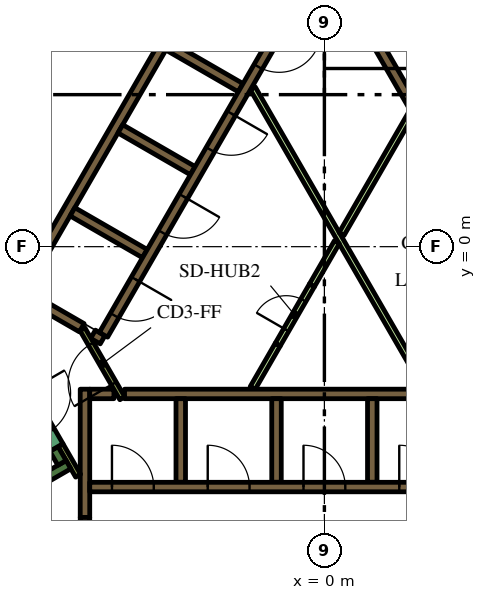
"""IFC4 building model, lengths in metres.
Left out: names, types, materials, properties, quantities, classifications, styles, units other than length and angle.
Written with IfcOpenShell. Run it as: python <this file> out.ifc"""

import sys

from ifc_helpers import new_model, si_unit, direction, frame, frame_2d, origin, place, context, subcontext, project, spatial, rectangle, extrude, element, fill, save


model = new_model("IFC4")
c1 = context("Model", 3, precision=1e-05, world=origin(), true_north=direction((0.0, 1.0)))
c2 = subcontext(c1, "Body", "Model", "MODEL_VIEW")
j1 = project(units=[si_unit("LENGTHUNIT", "METRE"), si_unit("PLANEANGLEUNIT", "RADIAN")], contexts=[c1])
p1 = place(None, origin())
s1 = spatial("IfcSite", under=j1, at=p1, CompositionType="ELEMENT")
p2 = place(p1, origin())
s2 = spatial("IfcBuilding", under=s1, at=p2, CompositionType="ELEMENT")
p3 = place(p2, frame((0.0, 0.0, 201.6)))
s3 = spatial("IfcBuildingStorey", under=s2, at=p3, CompositionType="ELEMENT", Elevation=201.6)
p4 = place(p3, frame((-12.625, -1.867, 0.0), z_axis=(0.0, 0.0, 1.0), x_axis=(0.499998841866, 0.866026072432, 0.0)))
e1 = element("IfcWall", 1, at=p4, inside=s3, PredefinedType="SOLIDWALL", context=c2, shape_type="SweptSolid", body=[
    extrude(rectangle(XDim=16.694, YDim=0.7, at=frame_2d((8.347, 0.0))), origin(), (0.0, 0.0, 1.0), 4.2),
])
p5 = place(p3, frame((-12.84, -9.261, 0.0), z_axis=(0.0, 0.0, 1.0), x_axis=(0.866016039709, 0.500016218704, 0.0)))
e2 = element("IfcWall", 2, at=p5, inside=s3, PredefinedType="SOLIDWALL", context=c2, shape_type="SweptSolid", body=[
    extrude(rectangle(XDim=7.05, YDim=0.25, at=frame_2d((3.525, 0.0))), origin(), (0.0, 0.0, 1.0), 4.2),
])
p6 = place(p3, frame((-6.905, -5.69, 0.0), z_axis=(0.0, 0.0, 1.0), x_axis=(-0.500402024738, 0.865793170242, 0.0)))
e3 = element("IfcWall", 3, at=p6, inside=s3, PredefinedType="SOLIDWALL", context=c2, shape_type="SweptSolid", body=[
    extrude(rectangle(XDim=0.425, YDim=0.25, at=frame_2d((0.212, 0.0))), origin(), (0.0, 0.0, 1.0), 4.2),
])
p7 = place(p3, frame((-5.259, -3.875, 0.0), z_axis=(0.0, 0.0, 1.0), x_axis=(1.0, 0.0, 0.0)))
e4 = element("IfcWall", 4, at=p7, inside=s3, PredefinedType="SOLIDWALL", context=c2, shape_type="SweptSolid", body=[
    extrude(rectangle(XDim=10.489, YDim=0.25, at=frame_2d((5.244, 0.0))), origin(), (0.0, 0.0, 1.0), 4.2),
])
for number, where, z_axis, x_axis in (
    (5, (1.26, -4.0, 0.0), (0.0, 0.0, 1.0), (0.0, -1.0, 0.0)),
    (6, (-1.26, -4.0, 0.0), (0.0, 0.0, 1.0), (0.0, -1.0, 0.0)),
    (7, (-3.78, -4.0, 0.0), (0.0, 0.0, 1.0), (0.0, -1.0, 0.0)),
):
    element("IfcWall", number, at=place(p3, frame(where, z_axis=z_axis, x_axis=x_axis)), inside=s3, PredefinedType="SOLIDWALL", context=c2, shape_type="SweptSolid", body=[
        extrude(rectangle(XDim=2.2, YDim=0.25, at=frame_2d((1.1, 0.0))), origin(), (0.0, 0.0, 1.0), 4.2),
    ])
p8 = place(p3, frame((-6.3, -7.125, 0.0), z_axis=(0.0, 0.0, 1.0), x_axis=(0.0, 1.0, 0.0)))
e8 = element("IfcWall", 8, at=p8, inside=s3, PredefinedType="SOLIDWALL", context=c2, shape_type="SweptSolid", body=[
    extrude(rectangle(XDim=3.375, YDim=0.25, at=frame_2d((1.687, 0.0))), origin(), (0.0, 0.0, 1.0), 4.2),
])
p9 = place(p3, frame((-6.175, -3.875, 0.0), z_axis=(0.0, 0.0, 1.0), x_axis=(1.0, 0.0, 0.0)))
e9 = element("IfcWall", 9, at=p9, inside=s3, PredefinedType="SOLIDWALL", context=c2, shape_type="SweptSolid", body=[
    extrude(rectangle(XDim=0.637, YDim=0.25, at=frame_2d((0.318, 0.0))), origin(), (0.0, 0.0, 1.0), 4.2),
])
p10 = place(p3, frame((5.97, -2.591, 0.0), z_axis=(0.0, 0.0, 1.0), x_axis=(-0.499994469932, 0.866028596547, 0.0)))
e10 = element("IfcWall", 10, at=p10, inside=s3, PredefinedType="SOLIDWALL", context=c2, shape_type="SweptSolid", body=[
    extrude(rectangle(XDim=10.488, YDim=0.25, at=frame_2d((5.244, 0.0))), origin(), (0.0, 0.0, 1.0), 4.2),
])
p11 = place(p3, frame((-3.02, 7.419, 0.0), z_axis=(0.0, 0.0, 1.0), x_axis=(-0.500022956343, -0.866012149528, 0.0)))
e11 = element("IfcWall", 11, at=p11, inside=s3, PredefinedType="SOLIDWALL", context=c2, shape_type="SweptSolid", body=[
    extrude(rectangle(XDim=10.08, YDim=0.25, at=frame_2d((5.04, 0.0))), origin(), (0.0, 0.0, 1.0), 4.2),
])
for number, where, z_axis, x_axis in (
    (12, (-2.204, 4.182, 0.0), (0.0, 0.0, 1.0), (-0.866, 0.5, 0.0)),
    (13, (-5.369, 3.1, 0.0), (0.0, 0.0, 1.0), (0.866, -0.5, 0.0)),
    (14, (-4.724, -0.182, 0.0), (0.0, 0.0, 1.0), (-0.866, 0.5, 0.0)),
):
    element("IfcWall", number, at=place(p3, frame(where, z_axis=z_axis, x_axis=x_axis)), inside=s3, PredefinedType="SOLIDWALL", context=c2, shape_type="SweptSolid", body=[
        extrude(rectangle(XDim=2.2, YDim=0.25, at=frame_2d((1.1, 0.0))), origin(), (0.0, 0.0, 1.0), 4.2),
    ])
p12 = place(p3, frame((-6.088, -2.305, 0.0), z_axis=(0.0, 0.0, 1.0), x_axis=(0.866059450854, -0.499941024108, 0.0)))
e15 = element("IfcWall", 15, at=p12, inside=s3, PredefinedType="SOLIDWALL", context=c2, shape_type="SweptSolid", body=[
    extrude(rectangle(XDim=0.29, YDim=0.25, at=frame_2d((0.145, 0.0))), origin(), (0.0, 0.0, 1.0), 4.2),
])
p13 = place(p3, frame((-7.889, -1.265, 0.0), z_axis=(0.0, 0.0, 1.0), x_axis=(0.865986741702, -0.500066958712, 0.0)))
e16 = element("IfcWall", 16, at=p13, inside=s3, PredefinedType="SOLIDWALL", context=c2, shape_type="SweptSolid", body=[
    extrude(rectangle(XDim=1.738, YDim=0.25, at=frame_2d((0.869, 0.0))), origin(), (0.0, 0.0, 1.0), 4.2),
])
p14 = place(p3, frame((-6.48, -6.027, 0.0), z_axis=(0.0, 0.0, 1.0), x_axis=(-0.499927229454, 0.866067413802, 0.0)))
e17 = element("IfcWall", 17, at=p14, inside=s3, PredefinedType="PARTITIONING", context=c2, shape_type="SweptSolid", body=[
    extrude(rectangle(XDim=0.929, YDim=0.15, at=frame_2d((0.464, 0.0))), origin(), (0.0, 0.0, 1.0), 4.2),
])
p15 = place(p3, frame((-1.887, 4.168, 0.0), z_axis=(0.0, 0.0, 1.0), x_axis=(0.499997069472, -0.866027095719, 0.0)))
e18 = element("IfcWall", 18, at=p15, inside=s3, PredefinedType="PARTITIONING", context=c2, shape_type="SweptSolid", body=[
    extrude(rectangle(XDim=9.106, YDim=0.15, at=frame_2d((4.553, 0.0))), origin(), (0.0, 0.0, 1.0), 3.45),
])
p16 = place(p3, frame((-0.329, -1.021, 0.0), z_axis=(0.0, 0.0, 1.0), x_axis=(0.500033191285, 0.866006239939, 0.0)))
e19 = element("IfcWall", 19, at=p16, inside=s3, PredefinedType="PARTITIONING", context=c2, shape_type="SweptSolid", body=[
    extrude(rectangle(XDim=1.315, YDim=0.15, at=frame_2d((0.657, 0.0))), origin(), (0.0, 0.0, 1.0), 3.45),
])
p17 = place(p3, frame((2.277, 3.493, 0.0), z_axis=(0.0, 0.0, 1.0), x_axis=(-0.499994550825, -0.866028549844, 0.0)))
e20 = element("IfcWall", 20, at=p17, inside=s3, PredefinedType="PARTITIONING", context=c2, shape_type="SweptSolid", body=[
    extrude(rectangle(XDim=3.65, YDim=0.15, at=frame_2d((1.825, 0.0))), origin(), (0.0, 0.0, 1.0), 3.45),
])
p18 = place(p3, frame((-1.887, -3.718, 0.0), z_axis=(0.0, 0.0, 1.0), x_axis=(0.500033191285, 0.866006239939, 0.0)))
e21 = element("IfcWall", 21, at=p18, inside=s3, PredefinedType="PARTITIONING", context=c2, shape_type="SweptSolid", body=[
    extrude(rectangle(XDim=1.315, YDim=0.15, at=frame_2d((0.657, 0.0))), origin(), (0.0, 0.0, 1.0), 3.45),
])
p19 = place(p3, frame((-6.175, -6.325, 0.0), z_axis=(0.0, 0.0, 1.0), x_axis=(1.0, 0.0, 0.0)))
e22 = element("IfcWall", 22, at=p19, inside=s3, PredefinedType="SOLIDWALL", context=c2, shape_type="SweptSolid", body=[
    extrude(rectangle(XDim=12.35, YDim=0.25, at=frame_2d((6.175, 0.0))), origin(), (0.0, 0.0, 1.0), 4.2),
])
p20 = place(p19, frame((0.585, 0.0, 0.0)))
e23 = element("IfcOpeningElement", 23, at=p20, cuts=e22, PredefinedType="OPENING", context=c2, shape_type="SweptSolid", body=[
    extrude(rectangle(XDim=1.1, YDim=2.1, at=frame_2d((0.55, 1.05))), frame((0.0, 0.135, 0.0), z_axis=(0.0, -1.0, 0.0), x_axis=(1.0, 0.0, 0.0)), (0.0, 0.0, 1.0), 0.27),
])
p21 = place(p19, frame((3.105, 0.0, 0.0)))
e24 = element("IfcOpeningElement", 24, at=p21, cuts=e22, PredefinedType="OPENING", context=c2, shape_type="SweptSolid", body=[
    extrude(rectangle(XDim=1.1, YDim=2.1, at=frame_2d((0.55, 1.05))), frame((0.0, 0.135, 0.0), z_axis=(0.0, -1.0, 0.0), x_axis=(1.0, 0.0, 0.0)), (0.0, 0.0, 1.0), 0.27),
])
p22 = place(p19, frame((5.625, 0.0, 0.0)))
e25 = element("IfcOpeningElement", 25, at=p22, cuts=e22, PredefinedType="OPENING", context=c2, shape_type="SweptSolid", body=[
    extrude(rectangle(XDim=1.1, YDim=2.1, at=frame_2d((0.55, 1.05))), frame((0.0, 0.135, 0.0), z_axis=(0.0, -1.0, 0.0), x_axis=(1.0, 0.0, 0.0)), (0.0, 0.0, 1.0), 0.27),
])
p23 = place(p19, frame((8.145, 0.0, 0.0)))
e26 = element("IfcOpeningElement", 26, at=p23, cuts=e22, PredefinedType="OPENING", context=c2, shape_type="SweptSolid", body=[
    extrude(rectangle(XDim=1.1, YDim=2.1, at=frame_2d((0.55, 1.05))), frame((0.0, 0.135, 0.0), z_axis=(0.0, -1.0, 0.0), x_axis=(1.0, 0.0, 0.0)), (0.0, 0.0, 1.0), 0.27),
])
p24 = place(p19, frame((10.665, 0.0, 0.0)))
e27 = element("IfcOpeningElement", 27, at=p24, cuts=e22, PredefinedType="OPENING", context=c2, shape_type="SweptSolid", body=[
    extrude(rectangle(XDim=1.1, YDim=2.1, at=frame_2d((0.55, 1.05))), frame((0.0, 0.135, 0.0), z_axis=(0.0, -1.0, 0.0), x_axis=(1.0, 0.0, 0.0)), (0.0, 0.0, 1.0), 0.27),
])
p25 = place(p3, frame((-0.898, 6.194, 0.0), z_axis=(0.0, 0.0, 1.0), x_axis=(-0.499996202215, -0.866027596426, 0.0)))
e28 = element("IfcWall", 28, at=p25, inside=s3, PredefinedType="SOLIDWALL", context=c2, shape_type="SweptSolid", body=[
    extrude(rectangle(XDim=9.83, YDim=0.25, at=frame_2d((4.915, 0.0))), origin(), (0.0, 0.0, 1.0), 4.2),
])
p26 = place(p25, frame((0.585, 0.0, 0.0)))
e29 = element("IfcOpeningElement", 29, at=p26, cuts=e28, PredefinedType="OPENING", context=c2, shape_type="SweptSolid", body=[
    extrude(rectangle(XDim=1.1, YDim=2.1, at=frame_2d((0.55, 1.05))), frame((0.0, 0.135, 0.0), z_axis=(0.0, -1.0, 0.0), x_axis=(1.0, 0.0, 0.0)), (0.0, 0.0, 1.0), 0.27),
])
p27 = place(p25, frame((3.105, 0.0, 0.0)))
e30 = element("IfcOpeningElement", 30, at=p27, cuts=e28, PredefinedType="OPENING", context=c2, shape_type="SweptSolid", body=[
    extrude(rectangle(XDim=1.1, YDim=2.1, at=frame_2d((0.55, 1.05))), frame((0.0, 0.135, 0.0), z_axis=(0.0, -1.0, 0.0), x_axis=(1.0, 0.0, 0.0)), (0.0, 0.0, 1.0), 0.27),
])
p28 = place(p25, frame((5.625, 0.0, 0.0)))
e31 = element("IfcOpeningElement", 31, at=p28, cuts=e28, PredefinedType="OPENING", context=c2, shape_type="SweptSolid", body=[
    extrude(rectangle(XDim=1.1, YDim=2.1, at=frame_2d((0.55, 1.05))), frame((0.0, 0.135, 0.0), z_axis=(0.0, -1.0, 0.0), x_axis=(1.0, 0.0, 0.0)), (0.0, 0.0, 1.0), 0.27),
])
p29 = place(p25, frame((8.145, 0.0, 0.0)))
e32 = element("IfcOpeningElement", 32, at=p29, cuts=e28, PredefinedType="OPENING", context=c2, shape_type="SweptSolid", body=[
    extrude(rectangle(XDim=1.1, YDim=2.1, at=frame_2d((0.55, 1.05))), frame((0.0, 0.135, 0.0), z_axis=(0.0, -1.0, 0.0), x_axis=(1.0, 0.0, 0.0)), (0.0, 0.0, 1.0), 0.27),
])
p30 = place(p3, frame((-8.103, -3.466, 0.0), z_axis=(0.0, 0.0, 1.0), x_axis=(0.500078061341, -0.865980330357, 0.0)))
e33 = element("IfcWall", 33, at=p30, inside=s3, PredefinedType="SOLIDWALL", context=c2, shape_type="SweptSolid", body=[
    extrude(rectangle(XDim=2.1, YDim=0.4, at=frame_2d((1.05, 0.0))), origin(), (0.0, 0.0, 1.0), 4.2),
])
p31 = place(p30, frame((0.45, 0.0, 0.0)))
e34 = element("IfcOpeningElement", 34, at=p31, cuts=e33, PredefinedType="OPENING", context=c2, shape_type="SweptSolid", body=[
    extrude(rectangle(XDim=1.2, YDim=2.1, at=frame_2d((0.6, 1.05))), frame((0.0, 0.21, 0.0), z_axis=(0.0, -1.0, 0.0), x_axis=(1.0, 0.0, 0.0)), (0.0, 0.0, 1.0), 0.42),
])
p32 = place(p3, frame((-6.3, -7.125, 0.0), z_axis=(0.0, 0.0, 1.0), x_axis=(0.0, -1.0, 0.0)))
e35 = element("IfcWall", 35, at=p32, inside=s3, PredefinedType="SOLIDWALL", context=c2, shape_type="SweptSolid", body=[
    extrude(rectangle(XDim=1.8, YDim=0.25, at=frame_2d((0.9, 0.0))), origin(), (0.0, 0.0, 1.0), 4.2),
])
p33 = place(p32, frame((0.45, 0.0, 0.0)))
e36 = element("IfcOpeningElement", 36, at=p33, cuts=e35, PredefinedType="OPENING", context=c2, shape_type="SweptSolid", body=[
    extrude(rectangle(XDim=0.9, YDim=2.1, at=frame_2d((0.45, 1.05))), frame((0.0, 0.135, 0.0), z_axis=(0.0, -1.0, 0.0), x_axis=(1.0, 0.0, 0.0)), (0.0, 0.0, 1.0), 0.27),
])
p34 = place(p3, frame((-5.317, -3.99, 0.0), z_axis=(0.0, 0.0, 1.0), x_axis=(-0.500027713859, 0.866009402589, 0.0)))
e37 = element("IfcWall", 37, at=p34, inside=s3, PredefinedType="PARTITIONING", context=c2, shape_type="SweptSolid", body=[
    extrude(rectangle(XDim=2.1, YDim=0.15, at=frame_2d((1.05, 0.0))), origin(), (0.0, 0.0, 1.0), 4.2),
])
p35 = place(p34, frame((0.45, 0.0, 0.0)))
e38 = element("IfcOpeningElement", 38, at=p35, cuts=e37, PredefinedType="OPENING", context=c2, shape_type="SweptSolid", body=[
    extrude(rectangle(XDim=1.2, YDim=2.1, at=frame_2d((0.6, 1.05))), frame((0.0, 0.085, 0.0), z_axis=(0.0, -1.0, 0.0), x_axis=(1.0, 0.0, 0.0)), (0.0, 0.0, 1.0), 0.17),
])
p36 = place(p3, frame((-1.229, -2.579, 0.0), z_axis=(0.0, 0.0, 1.0), x_axis=(0.500062916607, 0.865989075817, 0.0)))
e39 = element("IfcWall", 39, at=p36, inside=s3, PredefinedType="PARTITIONING", context=c2, shape_type="SweptSolid", body=[
    extrude(rectangle(XDim=1.8, YDim=0.15, at=frame_2d((0.9, 0.0))), origin(), (0.0, 0.0, 1.0), 3.45),
])
p37 = place(p36, frame((0.45, 0.0, 0.0)))
e40 = element("IfcOpeningElement", 40, at=p37, cuts=e39, PredefinedType="OPENING", context=c2, shape_type="SweptSolid", body=[
    extrude(rectangle(XDim=0.9, YDim=2.1, at=frame_2d((0.45, 1.05))), frame((0.0, 0.085, 0.0), z_axis=(0.0, -1.0, 0.0), x_axis=(1.0, 0.0, 0.0)), (0.0, 0.0, 1.0), 0.17),
])
p38 = place(p20, origin())
e41 = element("IfcDoor", 41, at=p38, inside=s3, OperationType="DOUBLE_DOOR_SLIDING", PredefinedType="DOOR", context=c2, shape_type="SweptSolid", body=[
    extrude(rectangle(XDim=1.1, YDim=2.1, at=frame_2d((0.55, 1.05))), frame((0.0, 0.025, 0.0), z_axis=(0.0, -1.0, 0.0), x_axis=(1.0, 0.0, 0.0)), (0.0, 0.0, 1.0), 0.05),
])
fill(e23, e41)
p39 = place(p21, origin())
e42 = element("IfcDoor", 42, at=p39, inside=s3, OperationType="DOUBLE_DOOR_SLIDING", PredefinedType="DOOR", context=c2, shape_type="SweptSolid", body=[
    extrude(rectangle(XDim=1.1, YDim=2.1, at=frame_2d((0.55, 1.05))), frame((0.0, 0.025, 0.0), z_axis=(0.0, -1.0, 0.0), x_axis=(1.0, 0.0, 0.0)), (0.0, 0.0, 1.0), 0.05),
])
fill(e24, e42)
p40 = place(p22, origin())
e43 = element("IfcDoor", 43, at=p40, inside=s3, OperationType="DOUBLE_DOOR_SLIDING", PredefinedType="DOOR", context=c2, shape_type="SweptSolid", body=[
    extrude(rectangle(XDim=1.1, YDim=2.1, at=frame_2d((0.55, 1.05))), frame((0.0, 0.025, 0.0), z_axis=(0.0, -1.0, 0.0), x_axis=(1.0, 0.0, 0.0)), (0.0, 0.0, 1.0), 0.05),
])
fill(e25, e43)
p41 = place(p23, origin())
e44 = element("IfcDoor", 44, at=p41, inside=s3, OperationType="DOUBLE_DOOR_SLIDING", PredefinedType="DOOR", context=c2, shape_type="SweptSolid", body=[
    extrude(rectangle(XDim=1.1, YDim=2.1, at=frame_2d((0.55, 1.05))), frame((0.0, 0.025, 0.0), z_axis=(0.0, -1.0, 0.0), x_axis=(1.0, 0.0, 0.0)), (0.0, 0.0, 1.0), 0.05),
])
fill(e26, e44)
p42 = place(p26, origin())
e45 = element("IfcDoor", 45, at=p42, inside=s3, OperationType="DOUBLE_DOOR_SLIDING", PredefinedType="DOOR", context=c2, shape_type="SweptSolid", body=[
    extrude(rectangle(XDim=1.1, YDim=2.1, at=frame_2d((0.55, 1.05))), frame((0.0, 0.025, 0.0), z_axis=(0.0, -1.0, 0.0), x_axis=(1.0, 0.0, 0.0)), (0.0, 0.0, 1.0), 0.05),
])
fill(e29, e45)
p43 = place(p27, origin())
e46 = element("IfcDoor", 46, at=p43, inside=s3, OperationType="DOUBLE_DOOR_SLIDING", PredefinedType="DOOR", context=c2, shape_type="SweptSolid", body=[
    extrude(rectangle(XDim=1.1, YDim=2.1, at=frame_2d((0.55, 1.05))), frame((0.0, 0.025, 0.0), z_axis=(0.0, -1.0, 0.0), x_axis=(1.0, 0.0, 0.0)), (0.0, 0.0, 1.0), 0.05),
])
fill(e30, e46)
p44 = place(p28, origin())
e47 = element("IfcDoor", 47, at=p44, inside=s3, OperationType="DOUBLE_DOOR_SLIDING", PredefinedType="DOOR", context=c2, shape_type="SweptSolid", body=[
    extrude(rectangle(XDim=1.1, YDim=2.1, at=frame_2d((0.55, 1.05))), frame((0.0, 0.025, 0.0), z_axis=(0.0, -1.0, 0.0), x_axis=(1.0, 0.0, 0.0)), (0.0, 0.0, 1.0), 0.05),
])
fill(e31, e47)
p45 = place(p29, origin())
e48 = element("IfcDoor", 48, at=p45, inside=s3, OperationType="DOUBLE_DOOR_SLIDING", PredefinedType="DOOR", context=c2, shape_type="SweptSolid", body=[
    extrude(rectangle(XDim=1.1, YDim=2.1, at=frame_2d((0.55, 1.05))), frame((0.0, 0.025, 0.0), z_axis=(0.0, -1.0, 0.0), x_axis=(1.0, 0.0, 0.0)), (0.0, 0.0, 1.0), 0.05),
])
fill(e32, e48)
p46 = place(p35, origin())
e49 = element("IfcDoor", 49, at=p46, inside=s3, OperationType="SINGLE_SWING_LEFT", PredefinedType="DOOR", context=c2, shape_type="SweptSolid", body=[
    extrude(rectangle(XDim=1.2, YDim=2.1, at=frame_2d((0.6, 1.05))), frame((0.0, 0.025, 0.0), z_axis=(0.0, -1.0, 0.0), x_axis=(1.0, 0.0, 0.0)), (0.0, 0.0, 1.0), 0.05),
])
fill(e38, e49)
p47 = place(p37, origin())
e50 = element("IfcDoor", 50, at=p47, inside=s3, OperationType="SINGLE_SWING_LEFT", PredefinedType="DOOR", context=c2, shape_type="SweptSolid", body=[
    extrude(rectangle(XDim=0.9, YDim=2.1, at=frame_2d((0.45, 1.05))), frame((0.0, 0.025, 0.0), z_axis=(0.0, -1.0, 0.0), x_axis=(1.0, 0.0, 0.0)), (0.0, 0.0, 1.0), 0.05),
])
fill(e40, e50)
save(model, sys.argv[1])
